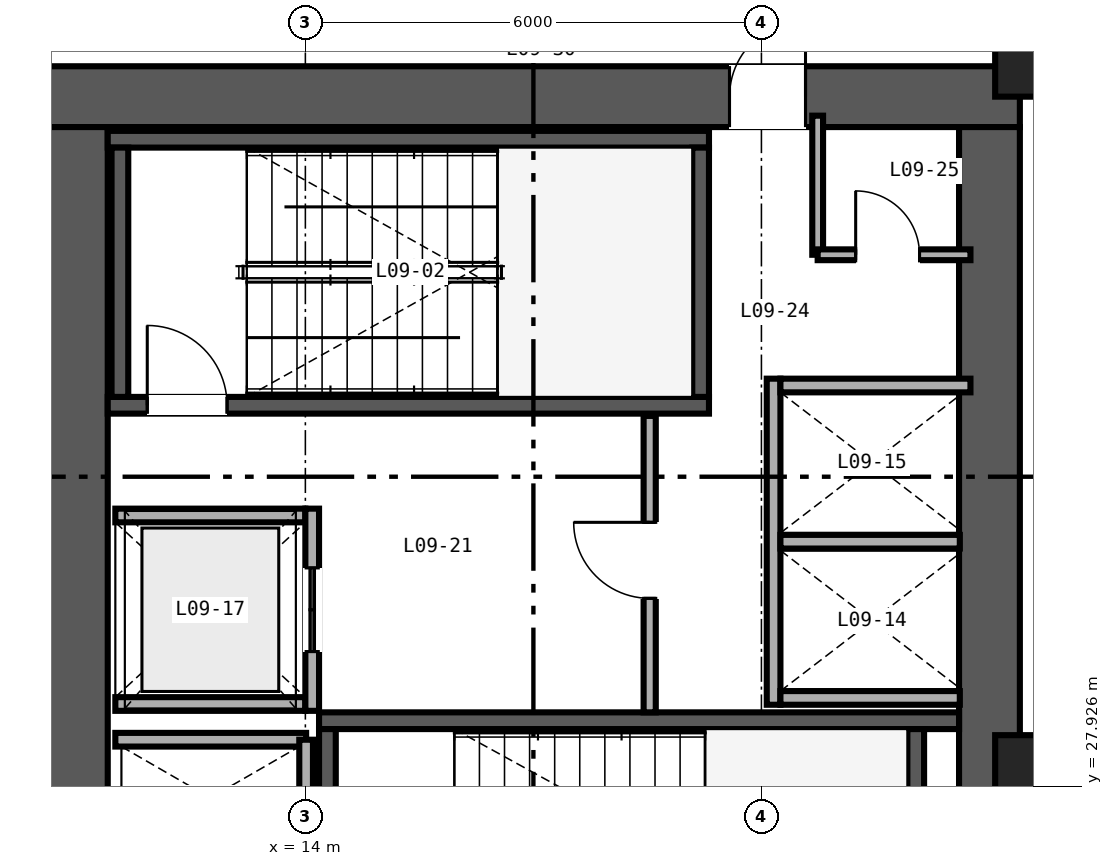
"""IFC4 building model, lengths in metres.
Left out: names, types, materials, properties, quantities, classifications, styles, units other than length and angle.
Written with IfcOpenShell. Run it as: python <this file> out.ifc"""

import sys

from ifc_helpers import new_model, si_unit, direction, frame, frame_2d, origin, origin_2d, place, context, subcontext, project, spatial, rectangle, hollow_rectangle, extrude, source, transform, mapped, element, fill, save


model = new_model("IFC4")
c1 = context("Model", 3, precision=1e-05, world=origin(), true_north=direction((0.0, 1.0)))
c2 = subcontext(c1, "Body", "Model", "MODEL_VIEW")
j1 = project(units=[si_unit("LENGTHUNIT", "METRE"), si_unit("PLANEANGLEUNIT", "RADIAN")], contexts=[c1])
p1 = place(None, origin())
s1 = spatial("IfcSite", under=j1, at=p1, CompositionType="ELEMENT")
p2 = place(p1, origin())
s2 = spatial("IfcBuilding", under=s1, at=p2, CompositionType="ELEMENT")
p3 = place(p2, frame((0.0, 0.0, 42.0)))
s3 = spatial("IfcBuildingStorey", under=s2, at=p3, CompositionType="ELEMENT", Elevation=42.0)
p4 = place(p3, frame((10.6, 37.0, 0.0), z_axis=(0.0, 0.0, 1.0), x_axis=(1.0, 0.0, 0.0)))
e1 = element("IfcWall", 1, at=p4, inside=s3, PredefinedType="SHEAR", context=c2, shape_type="SweptSolid", body=[
    extrude(rectangle(XDim=12.8, YDim=0.8, at=frame_2d((6.4, 0.0))), origin(), (0.0, 0.0, 1.0), 3.35),
])
p5 = place(p4, frame((8.98, 0.0, 0.0)))
e2 = element("IfcOpeningElement", 2, at=p5, cuts=e1, PredefinedType="OPENING", context=c2, shape_type="SweptSolid", body=[
    extrude(rectangle(XDim=1.0, YDim=2.15, at=frame_2d((0.5, 1.075))), frame((0.0, 0.41, 0.0), z_axis=(0.0, -1.0, 0.0), x_axis=(1.0, 0.0, 0.0)), (0.0, 0.0, 1.0), 0.82),
])
for number, where, z_axis, x_axis in (
    (3, (11.0, 15.4, 0.0), (0.0, 0.0, 1.0), (0.0, 1.0, 0.0)),
    (4, (23.0, 15.4, 0.0), (0.0, 0.0, 1.0), (0.0, 1.0, 0.0)),
):
    element("IfcWall", number, at=place(p3, frame(where, z_axis=z_axis, x_axis=x_axis)), inside=s3, PredefinedType="SHEAR", context=c2, shape_type="SweptSolid", body=[
        extrude(rectangle(XDim=21.2, YDim=0.8, at=frame_2d((10.6, 0.0))), origin(), (0.0, 0.0, 1.0), 3.35),
    ])
p6 = place(p3, frame((11.4, 32.94, 0.0), z_axis=(0.0, 0.0, 1.0), x_axis=(1.0, 0.0, 0.0)))
e5 = element("IfcWall", 5, at=p6, inside=s3, PredefinedType="SHEAR", context=c2, shape_type="SweptSolid", body=[
    extrude(rectangle(XDim=7.91, YDim=0.22, at=frame_2d((3.955, 0.0))), origin(), (0.0, 0.0, 1.0), 3.4),
])
p7 = place(p6, frame((0.52, 0.0, 0.0)))
e6 = element("IfcOpeningElement", 6, at=p7, cuts=e5, PredefinedType="OPENING", context=c2, shape_type="SweptSolid", body=[
    extrude(rectangle(XDim=1.05, YDim=2.15, at=frame_2d((0.525, 1.075))), frame((0.0, 0.12, 0.0), z_axis=(0.0, -1.0, 0.0), x_axis=(1.0, 0.0, 0.0)), (0.0, 0.0, 1.0), 0.24),
])
p8 = place(p3, frame((11.4, 36.44, 0.0), z_axis=(0.0, 0.0, 1.0), x_axis=(1.0, 0.0, 0.0)))
e7 = element("IfcWall", 7, at=p8, inside=s3, PredefinedType="SHEAR", context=c2, shape_type="SweptSolid", body=[
    extrude(rectangle(XDim=7.91, YDim=0.22, at=frame_2d((3.955, 0.0))), origin(), (0.0, 0.0, 1.0), 3.4),
])
for number, where, z_axis, x_axis in (
    (8, (11.56, 33.05, 0.0), (0.0, 0.0, 1.0), (0.0, 1.0, 0.0)),
    (9, (19.2, 33.05, 0.0), (0.0, 0.0, 1.0), (0.0, 1.0, 0.0)),
):
    element("IfcWall", number, at=place(p3, frame(where, z_axis=z_axis, x_axis=x_axis)), inside=s3, PredefinedType="SHEAR", context=c2, shape_type="SweptSolid", body=[
        extrude(rectangle(XDim=3.28, YDim=0.22, at=frame_2d((1.64, 0.0))), origin(), (0.0, 0.0, 1.0), 3.4),
    ])
p9 = place(p3, frame((14.18, 28.79, 0.0), z_axis=(0.0, 0.0, 1.0), x_axis=(1.0, 0.0, 0.0)))
e10 = element("IfcWall", 10, at=p9, inside=s3, PredefinedType="SHEAR", context=c2, shape_type="SweptSolid", body=[
    extrude(rectangle(XDim=8.42, YDim=0.22, at=frame_2d((4.21, 0.0))), origin(), (0.0, 0.0, 1.0), 3.4),
])
for number, where, z_axis, x_axis in (
    (11, (14.29, 25.4, 0.0), (0.0, 0.0, 1.0), (0.0, 1.0, 0.0)),
    (12, (22.03, 25.4, 0.0), (0.0, 0.0, 1.0), (0.0, 1.0, 0.0)),
):
    element("IfcWall", number, at=place(p3, frame(where, z_axis=z_axis, x_axis=x_axis)), inside=s3, PredefinedType="SHEAR", context=c2, shape_type="SweptSolid", body=[
        extrude(rectangle(XDim=3.28, YDim=0.22, at=frame_2d((1.64, 0.0))), origin(), (0.0, 0.0, 1.0), 3.4),
    ])
m1 = source(origin(), c2, "Body", "SweptSolid", [
    extrude(hollow_rectangle(XDim=0.85, YDim=0.9, WallThickness=0.04, at=origin_2d()), origin(), (0.0, 0.0, 1.0), 3.35),
])
for number, where, z_axis, x_axis in (
    (13, (23.5, 28.15, 0.0), (0.0, 0.0, 1.0), (1.0, 0.0, 0.0)),
    (14, (23.5, 37.45, 0.0), (0.0, 0.0, 1.0), (1.0, 0.0, 0.0)),
):
    element("IfcColumn", number, at=place(p3, frame(where, z_axis=z_axis, x_axis=x_axis)), inside=s3, PredefinedType="COLUMN", context=c2, shape_type="MappedRepresentation", body=[
        mapped(m1, transform((0.0, 0.0, 0.0), scale=1.0)),
    ])
p10 = place(p3, frame((20.16, 29.0, 0.0), z_axis=(0.0, 0.0, 1.0), x_axis=(0.0, 1.0, 0.0)))
e15 = element("IfcWall", 15, at=p10, inside=s3, PredefinedType="SOLIDWALL", context=c2, shape_type="SweptSolid", body=[
    extrude(rectangle(XDim=4.29, YDim=0.18, at=frame_2d((2.145, 0.0))), origin(), (0.0, 0.0, 1.0), 3.35),
])
p11 = place(p3, frame((20.25, 29.09, 0.0), z_axis=(0.0, 0.0, 1.0), x_axis=(1.0, 0.0, 0.0)))
e16 = element("IfcWall", 16, at=p11, inside=s3, PredefinedType="SOLIDWALL", context=c2, shape_type="SweptSolid", body=[
    extrude(rectangle(XDim=2.36, YDim=0.18, at=frame_2d((1.18, 0.0))), origin(), (0.0, 0.0, 1.0), 3.35),
])
p12 = place(p3, frame((20.25, 33.2, 0.0), z_axis=(0.0, 0.0, 1.0), x_axis=(1.0, 0.0, 0.0)))
e17 = element("IfcWall", 17, at=p12, inside=s3, PredefinedType="SOLIDWALL", context=c2, shape_type="SweptSolid", body=[
    extrude(rectangle(XDim=2.5, YDim=0.18, at=frame_2d((1.25, 0.0))), origin(), (0.0, 0.0, 1.0), 3.35),
])
p13 = place(p3, frame((20.25, 31.145, 0.0), z_axis=(0.0, 0.0, 1.0), x_axis=(1.0, 0.0, 0.0)))
e18 = element("IfcWall", 18, at=p13, inside=s3, PredefinedType="SOLIDWALL", context=c2, shape_type="SweptSolid", body=[
    extrude(rectangle(XDim=2.36, YDim=0.18, at=frame_2d((1.18, 0.0))), origin(), (0.0, 0.0, 1.0), 3.35),
])
for number, where, z_axis, x_axis in (
    (19, (11.5, 29.01, 0.0), (0.0, 0.0, 1.0), (1.0, 0.0, 0.0)),
    (20, (11.5, 31.49, 0.0), (0.0, 0.0, 1.0), (1.0, 0.0, 0.0)),
):
    element("IfcWall", number, at=place(p3, frame(where, z_axis=z_axis, x_axis=x_axis)), inside=s3, PredefinedType="SOLIDWALL", context=c2, shape_type="SweptSolid", body=[
        extrude(rectangle(XDim=2.5, YDim=0.18, at=frame_2d((1.25, 0.0))), origin(), (0.0, 0.0, 1.0), 3.35),
    ])
p14 = place(p3, frame((14.09, 28.92, 0.0), z_axis=(0.0, 0.0, 1.0), x_axis=(0.0, 1.0, 0.0)))
e21 = element("IfcWall", 21, at=p14, inside=s3, PredefinedType="SOLIDWALL", context=c2, shape_type="SweptSolid", body=[
    extrude(rectangle(XDim=2.66, YDim=0.18, at=frame_2d((1.33, 0.0))), origin(), (0.0, 0.0, 1.0), 3.35),
])
p15 = place(p14, frame((0.78, 0.0, 0.0)))
e22 = element("IfcOpeningElement", 22, at=p15, cuts=e21, PredefinedType="OPENING", context=c2, shape_type="SweptSolid", body=[
    extrude(rectangle(XDim=1.1, YDim=2.2, at=frame_2d((0.55, 1.1))), frame((0.0, 0.1, 0.0), z_axis=(0.0, -1.0, 0.0), x_axis=(1.0, 0.0, 0.0)), (0.0, 0.0, 1.0), 0.2),
])
p16 = place(p3, frame((11.5, 28.54, 0.0), z_axis=(0.0, 0.0, 1.0), x_axis=(1.0, 0.0, 0.0)))
e23 = element("IfcWall", 23, at=p16, inside=s3, PredefinedType="SOLIDWALL", context=c2, shape_type="SweptSolid", body=[
    extrude(rectangle(XDim=2.51, YDim=0.18, at=frame_2d((1.255, 0.0))), origin(), (0.0, 0.0, 1.0), 3.35),
])
p17 = place(p3, frame((14.01, 25.46, 0.0), z_axis=(0.0, 0.0, 1.0), x_axis=(0.0, 1.0, 0.0)))
e24 = element("IfcWall", 24, at=p17, inside=s3, PredefinedType="SOLIDWALL", context=c2, shape_type="SweptSolid", body=[
    extrude(rectangle(XDim=3.08, YDim=0.18, at=frame_2d((1.54, 0.0))), origin(), (0.0, 0.0, 1.0), 3.35),
])
p18 = place(p3, frame((18.53, 28.9, 0.0), z_axis=(0.0, 0.0, 1.0), x_axis=(0.0, 1.0, 0.0)))
e25 = element("IfcWall", 25, at=p18, inside=s3, PredefinedType="PARTITIONING", context=c2, shape_type="SweptSolid", body=[
    extrude(rectangle(XDim=3.9, YDim=0.16, at=frame_2d((1.95, 0.0))), origin(), (0.0, 0.0, 1.0), 3.35),
])
p19 = place(p18, frame((1.5, 0.0, 0.0)))
e26 = element("IfcOpeningElement", 26, at=p19, cuts=e25, PredefinedType="OPENING", context=c2, shape_type="SweptSolid", body=[
    extrude(rectangle(XDim=1.0, YDim=2.15, at=frame_2d((0.5, 1.075))), frame((0.0, 0.09, 0.0), z_axis=(0.0, -1.0, 0.0), x_axis=(1.0, 0.0, 0.0)), (0.0, 0.0, 1.0), 0.18),
])
p20 = place(p3, frame((20.74, 34.92, 0.0), z_axis=(0.0, 0.0, 1.0), x_axis=(0.0, 1.0, 0.0)))
e27 = element("IfcWall", 27, at=p20, inside=s3, PredefinedType="PARTITIONING", context=c2, shape_type="SweptSolid", body=[
    extrude(rectangle(XDim=1.83, YDim=0.142, at=frame_2d((0.915, 0.0))), origin(), (0.0, 0.0, 1.0), 3.35),
])
p21 = place(p3, frame((20.74, 34.92, 0.0), z_axis=(0.0, 0.0, 1.0), x_axis=(1.0, 0.0, 0.0)))
e28 = element("IfcWall", 28, at=p21, inside=s3, PredefinedType="PARTITIONING", context=c2, shape_type="SweptSolid", body=[
    extrude(rectangle(XDim=2.01, YDim=0.142, at=frame_2d((1.005, 0.0))), origin(), (0.0, 0.0, 1.0), 3.35),
])
p22 = place(p21, frame((0.5, 0.0, 0.0)))
e29 = element("IfcOpeningElement", 29, at=p22, cuts=e28, PredefinedType="OPENING", context=c2, shape_type="SweptSolid", body=[
    extrude(rectangle(XDim=0.84, YDim=2.1, at=frame_2d((0.42, 1.05))), frame((0.0, 0.081, 0.0), z_axis=(0.0, -1.0, 0.0), x_axis=(1.0, 0.0, 0.0)), (0.0, 0.0, 1.0), 0.162),
])
m2 = source(origin(), c2, "Body", "SweptSolid", [
    extrude(rectangle(XDim=1.05, YDim=2.15, at=frame_2d((0.525, 1.075))), frame((0.0, 0.025, 0.0), z_axis=(0.0, -1.0, 0.0), x_axis=(1.0, 0.0, 0.0)), (0.0, 0.0, 1.0), 0.05),
])
p23 = place(p7, origin())
e30 = element("IfcDoor", 30, at=p23, inside=s3, OperationType="SINGLE_SWING_LEFT", PredefinedType="DOOR", context=c2, shape_type="MappedRepresentation", body=[
    mapped(m2, transform((0.0, 0.0, 0.0), scale=1.0)),
])
fill(e6, e30)
m3 = source(origin(), c2, "Body", "SweptSolid", [
    extrude(rectangle(XDim=1.1, YDim=2.2, at=frame_2d((0.55, 1.1))), frame((0.0, 0.025, 0.0), z_axis=(0.0, -1.0, 0.0), x_axis=(1.0, 0.0, 0.0)), (0.0, 0.0, 1.0), 0.05),
])
p24 = place(p15, origin())
e31 = element("IfcDoor", 31, at=p24, inside=s3, OperationType="DOUBLE_DOOR_SLIDING", PredefinedType="DOOR", context=c2, shape_type="MappedRepresentation", body=[
    mapped(m3, transform((0.0, 0.0, 0.0), scale=1.0)),
])
fill(e22, e31)
m4 = source(origin(), c2, "Body", "SweptSolid", [
    extrude(rectangle(XDim=1.0, YDim=2.15, at=frame_2d((0.5, 1.075))), frame((0.0, 0.025, 0.0), z_axis=(0.0, -1.0, 0.0), x_axis=(1.0, 0.0, 0.0)), (0.0, 0.0, 1.0), 0.05),
])
p25 = place(p19, origin())
e32 = element("IfcDoor", 32, at=p25, inside=s3, OperationType="SINGLE_SWING_RIGHT", PredefinedType="DOOR", context=c2, shape_type="MappedRepresentation", body=[
    mapped(m4, transform((0.0, 0.0, 0.0), scale=1.0)),
])
fill(e26, e32)
m5 = source(origin(), c2, "Body", "SweptSolid", [
    extrude(rectangle(XDim=0.84, YDim=2.1, at=frame_2d((0.42, 1.05))), frame((0.0, 0.025, 0.0), z_axis=(0.0, -1.0, 0.0), x_axis=(1.0, 0.0, 0.0)), (0.0, 0.0, 1.0), 0.05),
])
p26 = place(p22, origin())
e33 = element("IfcDoor", 33, at=p26, inside=s3, OperationType="SINGLE_SWING_LEFT", PredefinedType="DOOR", context=c2, shape_type="MappedRepresentation", body=[
    mapped(m5, transform((0.0, 0.0, 0.0), scale=1.0)),
])
fill(e29, e33)
p27 = place(p5, origin())
e34 = element("IfcDoor", 34, at=p27, inside=s3, OperationType="SINGLE_SWING_RIGHT", PredefinedType="DOOR", context=c2, shape_type="MappedRepresentation", body=[
    mapped(m4, transform((0.0, 0.0, 0.0), scale=1.0)),
])
fill(e2, e34)
save(model, sys.argv[1])
